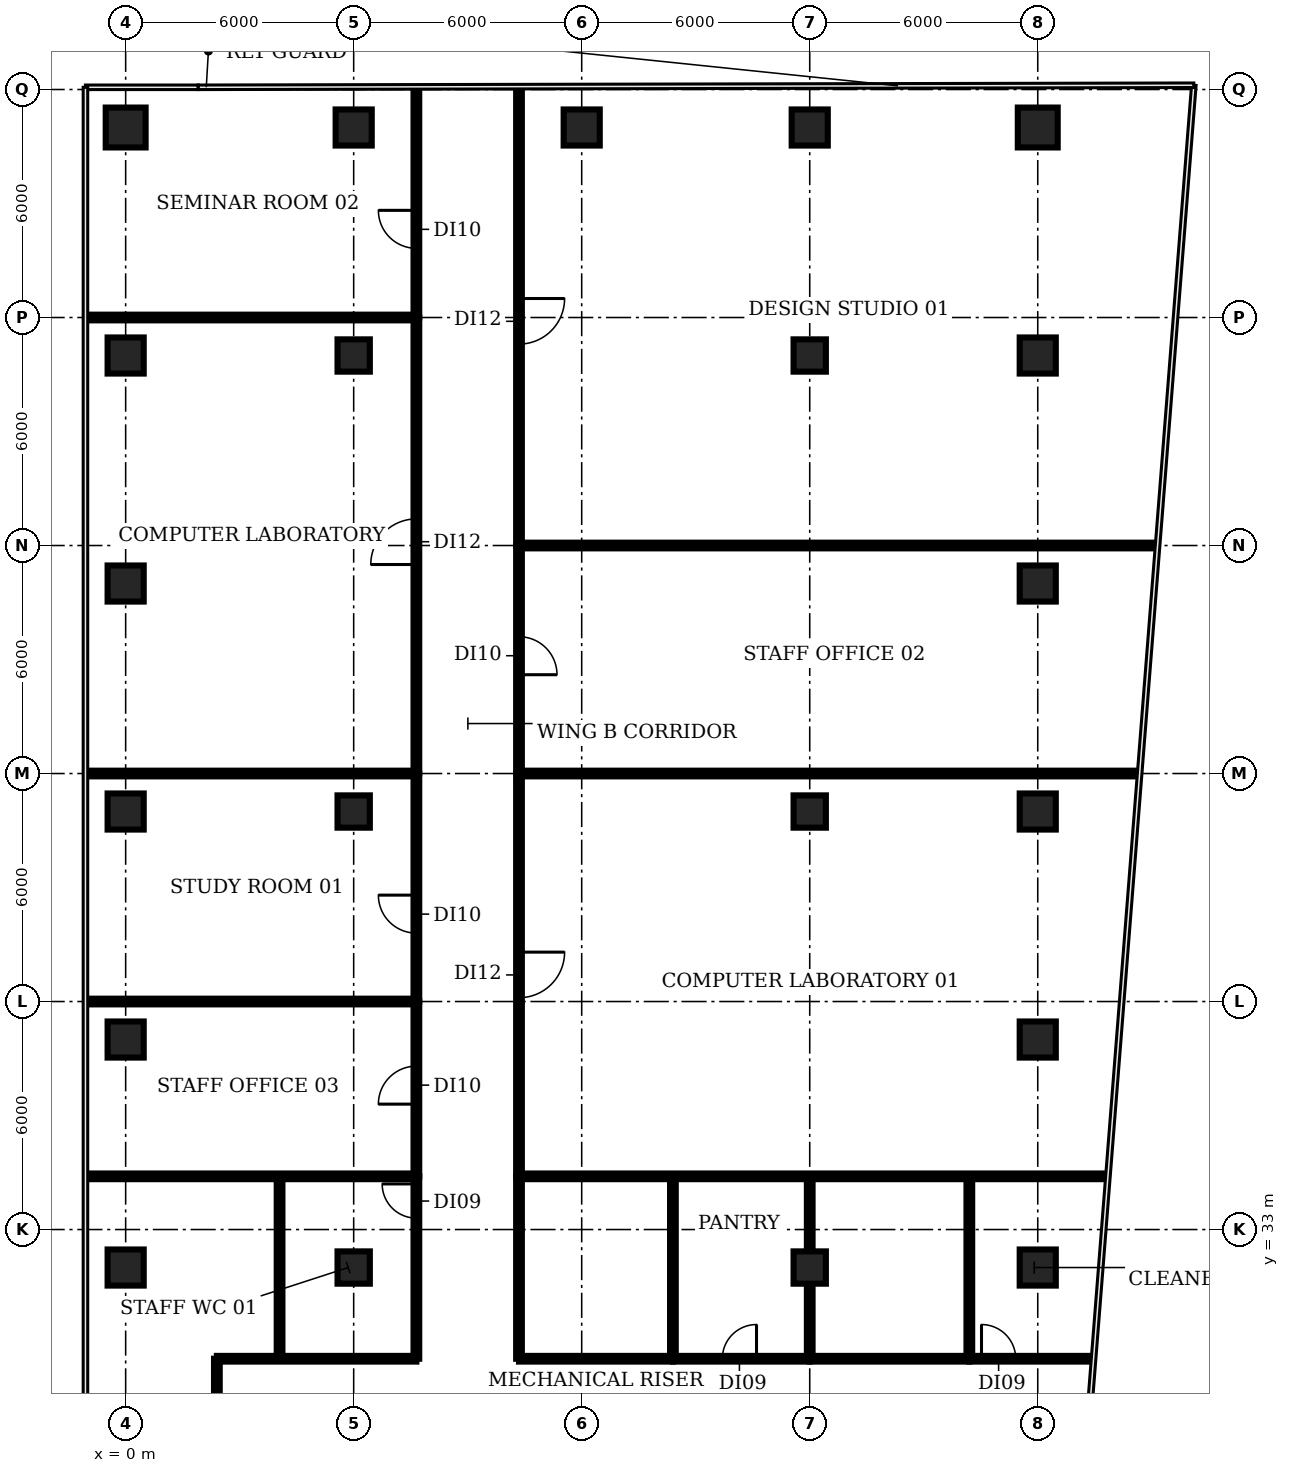
"""IFC4 building model, lengths in metres.
Left out: names, types, materials, properties, quantities, classifications, styles, units other than length and angle.
Written with IfcOpenShell. Run it as: python <this file> out.ifc"""

import sys

from ifc_helpers import new_model, si_unit, direction, frame, frame_2d, origin, origin_2d, place, context, subcontext, project, spatial, rectangle, circle, extrude, element, fill, save


model = new_model("IFC4")
c1 = context("Model", 3, precision=1e-05, world=origin(), true_north=direction((0.0, 1.0)))
c2 = subcontext(c1, "Body", "Model", "MODEL_VIEW")
j1 = project(units=[si_unit("LENGTHUNIT", "METRE"), si_unit("PLANEANGLEUNIT", "RADIAN")], contexts=[c1])
p1 = place(None, origin())
s1 = spatial("IfcSite", under=j1, at=p1, CompositionType="ELEMENT")
p2 = place(p1, origin())
s2 = spatial("IfcBuilding", under=s1, at=p2, CompositionType="ELEMENT")
p3 = place(p2, frame((0.0, 0.0, 33.2)))
s3 = spatial("IfcBuildingStorey", under=s2, at=p3, CompositionType="ELEMENT", Elevation=33.2)
for number, where, z_axis, x_axis in (
    (1, (0.0, 32.0, 0.0), (0.0, 0.0, 1.0), (1.0, 0.0, 0.0)),
    (2, (0.0, 38.0, 0.0), (0.0, 0.0, 1.0), (1.0, 0.0, 0.0)),
    (3, (0.0, 44.0, 0.0), (0.0, 0.0, 1.0), (1.0, 0.0, 0.0)),
    (4, (0.0, 50.0, 0.0), (0.0, 0.0, 1.0), (1.0, 0.0, 0.0)),
    (5, (0.0, 56.0, 0.0), (0.0, 0.0, 1.0), (1.0, 0.0, 0.0)),
):
    element("IfcColumn", number, at=place(p3, frame(where, z_axis=z_axis, x_axis=x_axis)), inside=s3, PredefinedType="COLUMN", context=c2, shape_type="SweptSolid", body=[
        extrude(rectangle(XDim=0.95, YDim=0.95, at=origin_2d()), origin(), (0.0, 0.0, 1.0), 3.85),
    ])
p4 = place(p3, frame((0.0, 62.0, 0.0), z_axis=(0.0, 0.0, 1.0), x_axis=(1.0, 0.0, 0.0)))
e6 = element("IfcColumn", 6, at=p4, inside=s3, PredefinedType="COLUMN", context=c2, shape_type="SweptSolid", body=[
    extrude(circle(Radius=0.525, at=origin_2d()), origin(), (0.0, 0.0, 1.0), 3.85),
])
for number, where, z_axis, x_axis in (
    (7, (6.0, 32.0, 0.0), (0.0, 0.0, 1.0), (1.0, 0.0, 0.0)),
    (8, (6.0, 44.0, 0.0), (0.0, 0.0, 1.0), (1.0, 0.0, 0.0)),
    (9, (6.0, 56.0, 0.0), (0.0, 0.0, 1.0), (1.0, 0.0, 0.0)),
):
    element("IfcColumn", number, at=place(p3, frame(where, z_axis=z_axis, x_axis=x_axis)), inside=s3, PredefinedType="COLUMN", context=c2, shape_type="SweptSolid", body=[
        extrude(rectangle(XDim=0.85, YDim=0.85, at=origin_2d()), origin(), (0.0, 0.0, 1.0), 3.85),
    ])
for number, where, z_axis, x_axis in (
    (10, (6.0, 62.0, 0.0), (0.0, 0.0, 1.0), (1.0, 0.0, 0.0)),
    (11, (12.0, 62.0, 0.0), (0.0, 0.0, 1.0), (1.0, 0.0, 0.0)),
):
    element("IfcColumn", number, at=place(p3, frame(where, z_axis=z_axis, x_axis=x_axis)), inside=s3, PredefinedType="COLUMN", context=c2, shape_type="SweptSolid", body=[
        extrude(rectangle(XDim=0.95, YDim=0.95, at=origin_2d()), origin(), (0.0, 0.0, 1.0), 3.85),
    ])
for number, where, z_axis, x_axis in (
    (12, (18.0, 32.0, 0.0), (0.0, 0.0, 1.0), (1.0, 0.0, 0.0)),
    (13, (18.0, 44.0, 0.0), (0.0, 0.0, 1.0), (1.0, 0.0, 0.0)),
    (14, (18.0, 56.0, 0.0), (0.0, 0.0, 1.0), (1.0, 0.0, 0.0)),
):
    element("IfcColumn", number, at=place(p3, frame(where, z_axis=z_axis, x_axis=x_axis)), inside=s3, PredefinedType="COLUMN", context=c2, shape_type="SweptSolid", body=[
        extrude(rectangle(XDim=0.85, YDim=0.85, at=origin_2d()), origin(), (0.0, 0.0, 1.0), 3.85),
    ])
for number, where, z_axis, x_axis in (
    (15, (18.0, 62.0, 0.0), (0.0, 0.0, 1.0), (1.0, 0.0, 0.0)),
    (16, (24.0, 32.0, 0.0), (0.0, 0.0, 1.0), (1.0, 0.0, 0.0)),
    (17, (24.0, 38.0, 0.0), (0.0, 0.0, 1.0), (1.0, 0.0, 0.0)),
    (18, (24.0, 44.0, 0.0), (0.0, 0.0, 1.0), (1.0, 0.0, 0.0)),
    (19, (24.0, 50.0, 0.0), (0.0, 0.0, 1.0), (1.0, 0.0, 0.0)),
    (20, (24.0, 56.0, 0.0), (0.0, 0.0, 1.0), (1.0, 0.0, 0.0)),
):
    element("IfcColumn", number, at=place(p3, frame(where, z_axis=z_axis, x_axis=x_axis)), inside=s3, PredefinedType="COLUMN", context=c2, shape_type="SweptSolid", body=[
        extrude(rectangle(XDim=0.95, YDim=0.95, at=origin_2d()), origin(), (0.0, 0.0, 1.0), 3.85),
    ])
p5 = place(p3, frame((24.0, 62.0, 0.0), z_axis=(0.0, 0.0, 1.0), x_axis=(1.0, 0.0, 0.0)))
e21 = element("IfcColumn", 21, at=p5, inside=s3, PredefinedType="COLUMN", context=c2, shape_type="SweptSolid", body=[
    extrude(circle(Radius=0.525, at=origin_2d()), origin(), (0.0, 0.0, 1.0), 3.85),
])
for number, where, z_axis, x_axis in (
    (22, (-1.01, 34.4, 0.0), (0.0, 0.0, 1.0), (1.0, 0.0, 0.0)),
    (23, (-1.01, 39.0, 0.0), (0.0, 0.0, 1.0), (1.0, 0.0, 0.0)),
    (24, (-1.01, 45.0, 0.0), (0.0, 0.0, 1.0), (1.0, 0.0, 0.0)),
    (25, (-1.01, 57.0, 0.0), (0.0, 0.0, 1.0), (1.0, 0.0, 0.0)),
):
    element("IfcWall", number, at=place(p3, frame(where, z_axis=z_axis, x_axis=x_axis)), inside=s3, PredefinedType="PARTITIONING", context=c2, shape_type="SweptSolid", body=[
        extrude(rectangle(XDim=8.66, YDim=0.15, at=frame_2d((4.33, 0.0))), origin(), (0.0, 0.0, 1.0), 2.83),
    ])
p6 = place(p3, frame((2.4, 25.7, 0.0), z_axis=(0.0, 0.0, 1.0), x_axis=(0.0, 1.0, 0.0)))
e26 = element("IfcWall", 26, at=p6, inside=s3, PredefinedType="PARTITIONING", context=c2, shape_type="SweptSolid", body=[
    extrude(rectangle(XDim=3.9, YDim=0.15, at=frame_2d((1.95, 0.0))), origin(), (0.0, 0.0, 1.0), 2.83),
])
p7 = place(p3, frame((2.4, 29.6, 0.0), z_axis=(0.0, 0.0, 1.0), x_axis=(1.0, 0.0, 0.0)))
e27 = element("IfcWall", 27, at=p7, inside=s3, PredefinedType="PARTITIONING", context=c2, shape_type="SweptSolid", body=[
    extrude(rectangle(XDim=5.25, YDim=0.15, at=frame_2d((2.625, 0.0))), origin(), (0.0, 0.0, 1.0), 2.83),
])
p8 = place(p3, frame((4.05, 29.6, 0.0), z_axis=(0.0, 0.0, 1.0), x_axis=(0.0, 1.0, 0.0)))
e28 = element("IfcWall", 28, at=p8, inside=s3, PredefinedType="PARTITIONING", context=c2, shape_type="SweptSolid", body=[
    extrude(rectangle(XDim=4.8, YDim=0.15, at=frame_2d((2.4, 0.0))), origin(), (0.0, 0.0, 1.0), 2.83),
])
p9 = place(p3, frame((7.65, 29.6, 0.0), z_axis=(0.0, 0.0, 1.0), x_axis=(0.0, 1.0, 0.0)))
e29 = element("IfcWall", 29, at=p9, inside=s3, PredefinedType="PARTITIONING", context=c2, shape_type="SweptSolid", body=[
    extrude(rectangle(XDim=4.8, YDim=0.15, at=frame_2d((2.4, 0.0))), origin(), (0.0, 0.0, 1.0), 2.83),
])
p10 = place(p9, frame((3.7, 0.0, 0.0)))
e30 = element("IfcOpeningElement", 30, at=p10, cuts=e29, PredefinedType="OPENING", context=c2, shape_type="SweptSolid", body=[
    extrude(rectangle(XDim=0.9, YDim=2.1, at=frame_2d((0.45, 1.05))), frame((0.0, 0.085, 0.0), z_axis=(0.0, -1.0, 0.0), x_axis=(1.0, 0.0, 0.0)), (0.0, 0.0, 1.0), 0.17),
])
p11 = place(p3, frame((7.65, 34.4, 0.0), z_axis=(0.0, 0.0, 1.0), x_axis=(0.0, 1.0, 0.0)))
e31 = element("IfcWall", 31, at=p11, inside=s3, PredefinedType="PARTITIONING", context=c2, shape_type="SweptSolid", body=[
    extrude(rectangle(XDim=4.6, YDim=0.15, at=frame_2d((2.3, 0.0))), origin(), (0.0, 0.0, 1.0), 2.83),
])
p12 = place(p11, frame((1.9, 0.0, 0.0)))
e32 = element("IfcOpeningElement", 32, at=p12, cuts=e31, PredefinedType="OPENING", context=c2, shape_type="SweptSolid", body=[
    extrude(rectangle(XDim=1.0, YDim=2.1, at=frame_2d((0.5, 1.05))), frame((0.0, 0.085, 0.0), z_axis=(0.0, -1.0, 0.0), x_axis=(1.0, 0.0, 0.0)), (0.0, 0.0, 1.0), 0.17),
])
p13 = place(p3, frame((7.65, 39.0, 0.0), z_axis=(0.0, 0.0, 1.0), x_axis=(0.0, 1.0, 0.0)))
e33 = element("IfcWall", 33, at=p13, inside=s3, PredefinedType="PARTITIONING", context=c2, shape_type="SweptSolid", body=[
    extrude(rectangle(XDim=6.0, YDim=0.15, at=frame_2d((3.0, 0.0))), origin(), (0.0, 0.0, 1.0), 2.83),
])
p14 = place(p13, frame((1.8, 0.0, 0.0)))
e34 = element("IfcOpeningElement", 34, at=p14, cuts=e33, PredefinedType="OPENING", context=c2, shape_type="SweptSolid", body=[
    extrude(rectangle(XDim=1.0, YDim=2.1, at=frame_2d((0.5, 1.05))), frame((0.0, 0.085, 0.0), z_axis=(0.0, -1.0, 0.0), x_axis=(1.0, 0.0, 0.0)), (0.0, 0.0, 1.0), 0.17),
])
p15 = place(p3, frame((7.65, 45.0, 0.0), z_axis=(0.0, 0.0, 1.0), x_axis=(0.0, 1.0, 0.0)))
e35 = element("IfcWall", 35, at=p15, inside=s3, PredefinedType="PARTITIONING", context=c2, shape_type="SweptSolid", body=[
    extrude(rectangle(XDim=12.0, YDim=0.15, at=frame_2d((6.0, 0.0))), origin(), (0.0, 0.0, 1.0), 2.83),
])
p16 = place(p15, frame((5.5, 0.0, 0.0)))
e36 = element("IfcOpeningElement", 36, at=p16, cuts=e35, PredefinedType="OPENING", context=c2, shape_type="SweptSolid", body=[
    extrude(rectangle(XDim=1.2, YDim=2.1, at=frame_2d((0.6, 1.05))), frame((0.0, 0.085, 0.0), z_axis=(0.0, -1.0, 0.0), x_axis=(1.0, 0.0, 0.0)), (0.0, 0.0, 1.0), 0.17),
])
p17 = place(p3, frame((7.65, 57.0, 0.0), z_axis=(0.0, 0.0, 1.0), x_axis=(0.0, 1.0, 0.0)))
e37 = element("IfcWall", 37, at=p17, inside=s3, PredefinedType="PARTITIONING", context=c2, shape_type="SweptSolid", body=[
    extrude(rectangle(XDim=6.02, YDim=0.15, at=frame_2d((3.01, 0.0))), origin(), (0.0, 0.0, 1.0), 2.83),
])
p18 = place(p17, frame((1.82, 0.0, 0.0)))
e38 = element("IfcOpeningElement", 38, at=p18, cuts=e37, PredefinedType="OPENING", context=c2, shape_type="SweptSolid", body=[
    extrude(rectangle(XDim=1.0, YDim=2.1, at=frame_2d((0.5, 1.05))), frame((0.0, 0.085, 0.0), z_axis=(0.0, -1.0, 0.0), x_axis=(1.0, 0.0, 0.0)), (0.0, 0.0, 1.0), 0.17),
])
p19 = place(p3, frame((10.35, 29.6, 0.0), z_axis=(0.0, 0.0, 1.0), x_axis=(0.0, 1.0, 0.0)))
e39 = element("IfcWall", 39, at=p19, inside=s3, PredefinedType="PARTITIONING", context=c2, shape_type="SweptSolid", body=[
    extrude(rectangle(XDim=4.8, YDim=0.15, at=frame_2d((2.4, 0.0))), origin(), (0.0, 0.0, 1.0), 2.83),
])
p20 = place(p3, frame((10.35, 29.6, 0.0), z_axis=(0.0, 0.0, 1.0), x_axis=(1.0, 0.0, 0.0)))
e40 = element("IfcWall", 40, at=p20, inside=s3, PredefinedType="PARTITIONING", context=c2, shape_type="SweptSolid", body=[
    extrude(rectangle(XDim=4.05, YDim=0.15, at=frame_2d((2.025, 0.0))), origin(), (0.0, 0.0, 1.0), 2.83),
])
p21 = place(p3, frame((10.35, 34.4, 0.0), z_axis=(0.0, 0.0, 1.0), x_axis=(1.0, 0.0, 0.0)))
e41 = element("IfcWall", 41, at=p21, inside=s3, PredefinedType="PARTITIONING", context=c2, shape_type="SweptSolid", body=[
    extrude(rectangle(XDim=15.45, YDim=0.15, at=frame_2d((7.725, 0.0))), origin(), (0.0, 0.0, 1.0), 2.83),
])
p22 = place(p3, frame((10.35, 45.0, 0.0), z_axis=(0.0, 0.0, 1.0), x_axis=(0.0, -1.0, 0.0)))
e42 = element("IfcWall", 42, at=p22, inside=s3, PredefinedType="PARTITIONING", context=c2, shape_type="SweptSolid", body=[
    extrude(rectangle(XDim=10.6, YDim=0.15, at=frame_2d((5.3, 0.0))), origin(), (0.0, 0.0, 1.0), 2.83),
])
p23 = place(p22, frame((4.7, 0.0, 0.0)))
e43 = element("IfcOpeningElement", 43, at=p23, cuts=e42, PredefinedType="OPENING", context=c2, shape_type="SweptSolid", body=[
    extrude(rectangle(XDim=1.2, YDim=2.1, at=frame_2d((0.6, 1.05))), frame((0.0, 0.085, 0.0), z_axis=(0.0, -1.0, 0.0), x_axis=(1.0, 0.0, 0.0)), (0.0, 0.0, 1.0), 0.17),
])
p24 = place(p3, frame((10.35, 45.0, 0.0), z_axis=(0.0, 0.0, 1.0), x_axis=(1.0, 0.0, 0.0)))
e44 = element("IfcWall", 44, at=p24, inside=s3, PredefinedType="PARTITIONING", context=c2, shape_type="SweptSolid", body=[
    extrude(rectangle(XDim=16.255, YDim=0.15, at=frame_2d((8.127, 0.0))), origin(), (0.0, 0.0, 1.0), 2.83),
])
p25 = place(p3, frame((10.35, 51.0, 0.0), z_axis=(0.0, 0.0, 1.0), x_axis=(0.0, -1.0, 0.0)))
e45 = element("IfcWall", 45, at=p25, inside=s3, PredefinedType="PARTITIONING", context=c2, shape_type="SweptSolid", body=[
    extrude(rectangle(XDim=6.0, YDim=0.15, at=frame_2d((3.0, 0.0))), origin(), (0.0, 0.0, 1.0), 2.83),
])
p26 = place(p25, frame((2.4, 0.0, 0.0)))
e46 = element("IfcOpeningElement", 46, at=p26, cuts=e45, PredefinedType="OPENING", context=c2, shape_type="SweptSolid", body=[
    extrude(rectangle(XDim=1.0, YDim=2.1, at=frame_2d((0.5, 1.05))), frame((0.0, 0.085, 0.0), z_axis=(0.0, -1.0, 0.0), x_axis=(1.0, 0.0, 0.0)), (0.0, 0.0, 1.0), 0.17),
])
p27 = place(p3, frame((10.35, 51.0, 0.0), z_axis=(0.0, 0.0, 1.0), x_axis=(1.0, 0.0, 0.0)))
e47 = element("IfcWall", 47, at=p27, inside=s3, PredefinedType="PARTITIONING", context=c2, shape_type="SweptSolid", body=[
    extrude(rectangle(XDim=16.734, YDim=0.15, at=frame_2d((8.367, 0.0))), origin(), (0.0, 0.0, 1.0), 2.83),
])
p28 = place(p3, frame((10.35, 63.03, 0.0), z_axis=(0.0, 0.0, 1.0), x_axis=(0.0, -1.0, 0.0)))
e48 = element("IfcWall", 48, at=p28, inside=s3, PredefinedType="PARTITIONING", context=c2, shape_type="SweptSolid", body=[
    extrude(rectangle(XDim=12.03, YDim=0.15, at=frame_2d((6.015, 0.0))), origin(), (0.0, 0.0, 1.0), 2.83),
])
p29 = place(p28, frame((5.53, 0.0, 0.0)))
e49 = element("IfcOpeningElement", 49, at=p29, cuts=e48, PredefinedType="OPENING", context=c2, shape_type="SweptSolid", body=[
    extrude(rectangle(XDim=1.2, YDim=2.1, at=frame_2d((0.6, 1.05))), frame((0.0, 0.085, 0.0), z_axis=(0.0, -1.0, 0.0), x_axis=(1.0, 0.0, 0.0)), (0.0, 0.0, 1.0), 0.17),
])
p30 = place(p3, frame((14.4, 29.6, 0.0), z_axis=(0.0, 0.0, 1.0), x_axis=(0.0, 1.0, 0.0)))
e50 = element("IfcWall", 50, at=p30, inside=s3, PredefinedType="PARTITIONING", context=c2, shape_type="SweptSolid", body=[
    extrude(rectangle(XDim=4.8, YDim=0.15, at=frame_2d((2.4, 0.0))), origin(), (0.0, 0.0, 1.0), 2.83),
])
p31 = place(p3, frame((14.4, 29.6, 0.0), z_axis=(0.0, 0.0, 1.0), x_axis=(1.0, 0.0, 0.0)))
e51 = element("IfcWall", 51, at=p31, inside=s3, PredefinedType="PARTITIONING", context=c2, shape_type="SweptSolid", body=[
    extrude(rectangle(XDim=3.6, YDim=0.15, at=frame_2d((1.8, 0.0))), origin(), (0.0, 0.0, 1.0), 2.83),
])
p32 = place(p31, frame((1.3, 0.0, 0.0)))
e52 = element("IfcOpeningElement", 52, at=p32, cuts=e51, PredefinedType="OPENING", context=c2, shape_type="SweptSolid", body=[
    extrude(rectangle(XDim=0.9, YDim=2.1, at=frame_2d((0.45, 1.05))), frame((0.0, 0.085, 0.0), z_axis=(0.0, -1.0, 0.0), x_axis=(1.0, 0.0, 0.0)), (0.0, 0.0, 1.0), 0.17),
])
p33 = place(p3, frame((18.0, 29.6, 0.0), z_axis=(0.0, 0.0, 1.0), x_axis=(0.0, 1.0, 0.0)))
e53 = element("IfcWall", 53, at=p33, inside=s3, PredefinedType="PARTITIONING", context=c2, shape_type="SweptSolid", body=[
    extrude(rectangle(XDim=4.8, YDim=0.15, at=frame_2d((2.4, 0.0))), origin(), (0.0, 0.0, 1.0), 2.83),
])
p34 = place(p3, frame((18.0, 29.6, 0.0), z_axis=(0.0, 0.0, 1.0), x_axis=(1.0, 0.0, 0.0)))
e54 = element("IfcWall", 54, at=p34, inside=s3, PredefinedType="PARTITIONING", context=c2, shape_type="SweptSolid", body=[
    extrude(rectangle(XDim=4.2, YDim=0.15, at=frame_2d((2.1, 0.0))), origin(), (0.0, 0.0, 1.0), 2.83),
])
p35 = place(p3, frame((22.2, 29.6, 0.0), z_axis=(0.0, 0.0, 1.0), x_axis=(0.0, 1.0, 0.0)))
e55 = element("IfcWall", 55, at=p35, inside=s3, PredefinedType="PARTITIONING", context=c2, shape_type="SweptSolid", body=[
    extrude(rectangle(XDim=4.8, YDim=0.15, at=frame_2d((2.4, 0.0))), origin(), (0.0, 0.0, 1.0), 2.83),
])
p36 = place(p3, frame((22.2, 29.6, 0.0), z_axis=(0.0, 0.0, 1.0), x_axis=(1.0, 0.0, 0.0)))
e56 = element("IfcWall", 56, at=p36, inside=s3, PredefinedType="PARTITIONING", context=c2, shape_type="SweptSolid", body=[
    extrude(rectangle(XDim=3.22, YDim=0.15, at=frame_2d((1.61, 0.0))), origin(), (0.0, 0.0, 1.0), 2.83),
])
p37 = place(p36, frame((0.32, 0.0, 0.0)))
e57 = element("IfcOpeningElement", 57, at=p37, cuts=e56, PredefinedType="OPENING", context=c2, shape_type="SweptSolid", body=[
    extrude(rectangle(XDim=0.9, YDim=2.1, at=frame_2d((0.45, 1.05))), frame((0.0, 0.085, 0.0), z_axis=(0.0, -1.0, 0.0), x_axis=(1.0, 0.0, 0.0)), (0.0, 0.0, 1.0), 0.17),
])
p38 = place(p10, origin())
e58 = element("IfcDoor", 58, at=p38, inside=s3, OperationType="SINGLE_SWING_RIGHT", PredefinedType="DOOR", context=c2, shape_type="SweptSolid", body=[
    extrude(rectangle(XDim=0.9, YDim=2.1, at=frame_2d((0.45, 1.05))), frame((0.0, 0.025, 0.0), z_axis=(0.0, -1.0, 0.0), x_axis=(1.0, 0.0, 0.0)), (0.0, 0.0, 1.0), 0.05),
])
fill(e30, e58)
p39 = place(p12, origin())
e59 = element("IfcDoor", 59, at=p39, inside=s3, OperationType="SINGLE_SWING_LEFT", PredefinedType="DOOR", context=c2, shape_type="SweptSolid", body=[
    extrude(rectangle(XDim=1.0, YDim=2.1, at=frame_2d((0.5, 1.05))), frame((0.0, 0.025, 0.0), z_axis=(0.0, -1.0, 0.0), x_axis=(1.0, 0.0, 0.0)), (0.0, 0.0, 1.0), 0.05),
])
fill(e32, e59)
p40 = place(p14, origin())
e60 = element("IfcDoor", 60, at=p40, inside=s3, OperationType="SINGLE_SWING_RIGHT", PredefinedType="DOOR", context=c2, shape_type="SweptSolid", body=[
    extrude(rectangle(XDim=1.0, YDim=2.1, at=frame_2d((0.5, 1.05))), frame((0.0, 0.025, 0.0), z_axis=(0.0, -1.0, 0.0), x_axis=(1.0, 0.0, 0.0)), (0.0, 0.0, 1.0), 0.05),
])
fill(e34, e60)
p41 = place(p16, origin())
e61 = element("IfcDoor", 61, at=p41, inside=s3, OperationType="SINGLE_SWING_LEFT", PredefinedType="DOOR", context=c2, shape_type="SweptSolid", body=[
    extrude(rectangle(XDim=1.2, YDim=2.1, at=frame_2d((0.6, 1.05))), frame((0.0, 0.025, 0.0), z_axis=(0.0, -1.0, 0.0), x_axis=(1.0, 0.0, 0.0)), (0.0, 0.0, 1.0), 0.05),
])
fill(e36, e61)
p42 = place(p18, origin())
e62 = element("IfcDoor", 62, at=p42, inside=s3, OperationType="SINGLE_SWING_RIGHT", PredefinedType="DOOR", context=c2, shape_type="SweptSolid", body=[
    extrude(rectangle(XDim=1.0, YDim=2.1, at=frame_2d((0.5, 1.05))), frame((0.0, 0.025, 0.0), z_axis=(0.0, -1.0, 0.0), x_axis=(1.0, 0.0, 0.0)), (0.0, 0.0, 1.0), 0.05),
])
fill(e38, e62)
p43 = place(p23, origin())
e63 = element("IfcDoor", 63, at=p43, inside=s3, OperationType="SINGLE_SWING_LEFT", PredefinedType="DOOR", context=c2, shape_type="SweptSolid", body=[
    extrude(rectangle(XDim=1.2, YDim=2.1, at=frame_2d((0.6, 1.05))), frame((0.0, 0.025, 0.0), z_axis=(0.0, -1.0, 0.0), x_axis=(1.0, 0.0, 0.0)), (0.0, 0.0, 1.0), 0.05),
])
fill(e43, e63)
p44 = place(p26, origin())
e64 = element("IfcDoor", 64, at=p44, inside=s3, OperationType="SINGLE_SWING_RIGHT", PredefinedType="DOOR", context=c2, shape_type="SweptSolid", body=[
    extrude(rectangle(XDim=1.0, YDim=2.1, at=frame_2d((0.5, 1.05))), frame((0.0, 0.025, 0.0), z_axis=(0.0, -1.0, 0.0), x_axis=(1.0, 0.0, 0.0)), (0.0, 0.0, 1.0), 0.05),
])
fill(e46, e64)
p45 = place(p29, origin())
e65 = element("IfcDoor", 65, at=p45, inside=s3, OperationType="SINGLE_SWING_LEFT", PredefinedType="DOOR", context=c2, shape_type="SweptSolid", body=[
    extrude(rectangle(XDim=1.2, YDim=2.1, at=frame_2d((0.6, 1.05))), frame((0.0, 0.025, 0.0), z_axis=(0.0, -1.0, 0.0), x_axis=(1.0, 0.0, 0.0)), (0.0, 0.0, 1.0), 0.05),
])
fill(e49, e65)
p46 = place(p32, origin())
e66 = element("IfcDoor", 66, at=p46, inside=s3, OperationType="SINGLE_SWING_RIGHT", PredefinedType="DOOR", context=c2, shape_type="SweptSolid", body=[
    extrude(rectangle(XDim=0.9, YDim=2.1, at=frame_2d((0.45, 1.05))), frame((0.0, 0.025, 0.0), z_axis=(0.0, -1.0, 0.0), x_axis=(1.0, 0.0, 0.0)), (0.0, 0.0, 1.0), 0.05),
])
fill(e52, e66)
p47 = place(p37, origin())
e67 = element("IfcDoor", 67, at=p47, inside=s3, OperationType="SINGLE_SWING_LEFT", PredefinedType="DOOR", context=c2, shape_type="SweptSolid", body=[
    extrude(rectangle(XDim=0.9, YDim=2.1, at=frame_2d((0.45, 1.05))), frame((0.0, 0.025, 0.0), z_axis=(0.0, -1.0, 0.0), x_axis=(1.0, 0.0, 0.0)), (0.0, 0.0, 1.0), 0.05),
])
fill(e57, e67)
save(model, sys.argv[1])
